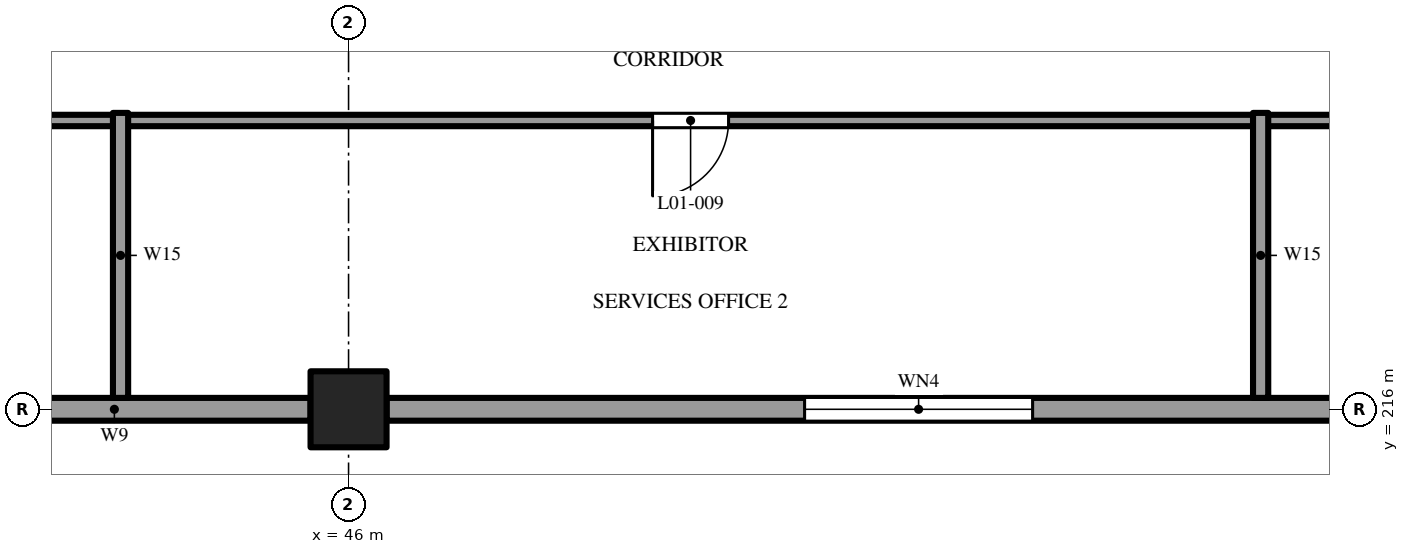
"""IFC4 building model, lengths in metres.
Left out: names, types, materials, properties, quantities, classifications, styles, units other than length and angle.
Written with IfcOpenShell. Run it as: python <this file> out.ifc"""

import sys

from ifc_helpers import new_model, si_unit, direction, frame, frame_2d, origin, origin_2d, place, context, subcontext, project, spatial, polyline, rectangle, outline, extrude, element, fill, save


model = new_model("IFC4")
c1 = context("Model", 3, precision=1e-05, world=origin(), true_north=direction((0.0, 1.0)))
c2 = subcontext(c1, "Body", "Model", "MODEL_VIEW")
j1 = project(units=[si_unit("LENGTHUNIT", "METRE"), si_unit("PLANEANGLEUNIT", "RADIAN")], contexts=[c1])
p1 = place(None, origin())
s1 = spatial("IfcSite", under=j1, at=p1, CompositionType="ELEMENT")
p2 = place(p1, origin())
s2 = spatial("IfcBuilding", under=s1, at=p2, CompositionType="ELEMENT")
p3 = place(p2, frame((0.0, 0.0, 7.2)))
s3 = spatial("IfcBuildingStorey", under=s2, at=p3, CompositionType="ELEMENT", Elevation=7.2)
p4 = place(p3, frame((46.0, 216.0, 0.0), z_axis=(0.0, 0.0, 1.0), x_axis=(1.0, 0.0, 0.0)))
e1 = element("IfcColumn", 1, at=p4, inside=s3, PredefinedType="COLUMN", context=c2, shape_type="SweptSolid", body=[
    extrude(rectangle(XDim=1.0, YDim=1.0, at=origin_2d()), origin(), (0.0, 0.0, 1.0), 4.8),
])
p5 = place(p3, frame((28.5, 216.0, 0.0), z_axis=(0.0, 0.0, 1.0), x_axis=(1.0, 0.0, 0.0)))
e2 = element("IfcWall", 2, at=p5, inside=s3, PredefinedType="SOLIDWALL", context=c2, shape_type="SweptSolid", body=[
    extrude(rectangle(XDim=17.0, YDim=0.3, at=frame_2d((8.5, 0.0))), origin(), (0.0, 0.0, 1.0), 4.8),
])
p6 = place(p5, frame((2.538, 0.0, 1.0)))
e3 = element("IfcOpeningElement", 3, at=p6, cuts=e2, PredefinedType="OPENING", context=c2, shape_type="SweptSolid", body=[
    extrude(rectangle(XDim=3.0, YDim=1.8, at=frame_2d((1.5, 0.9))), frame((0.0, 0.16, 0.0), z_axis=(0.0, -1.0, 0.0), x_axis=(1.0, 0.0, 0.0)), (0.0, 0.0, 1.0), 0.32),
])
p7 = place(p5, frame((8.538, 0.0, 1.0)))
e4 = element("IfcOpeningElement", 4, at=p7, cuts=e2, PredefinedType="OPENING", context=c2, shape_type="SweptSolid", body=[
    extrude(rectangle(XDim=3.0, YDim=1.8, at=frame_2d((1.5, 0.9))), frame((0.0, 0.16, 0.0), z_axis=(0.0, -1.0, 0.0), x_axis=(1.0, 0.0, 0.0)), (0.0, 0.0, 1.0), 0.32),
])
p8 = place(p3, frame((46.5, 216.0, 0.0), z_axis=(0.0, 0.0, 1.0), x_axis=(1.0, 0.0, 0.0)))
e5 = element("IfcWall", 5, at=p8, inside=s3, PredefinedType="SOLIDWALL", context=c2, shape_type="SweptSolid", body=[
    extrude(rectangle(XDim=17.0, YDim=0.3, at=frame_2d((8.5, 0.0))), origin(), (0.0, 0.0, 1.0), 4.8),
])
p9 = place(p8, frame((5.5, 0.0, 1.0)))
e6 = element("IfcOpeningElement", 6, at=p9, cuts=e5, PredefinedType="OPENING", context=c2, shape_type="SweptSolid", body=[
    extrude(rectangle(XDim=3.0, YDim=1.8, at=frame_2d((1.5, 0.9))), frame((0.0, 0.16, 0.0), z_axis=(0.0, -1.0, 0.0), x_axis=(1.0, 0.0, 0.0)), (0.0, 0.0, 1.0), 0.32),
])
p10 = place(p3, frame((28.175, 219.8, 0.0), z_axis=(0.0, 0.0, 1.0), x_axis=(1.0, 0.0, 0.0)))
e7 = element("IfcWall", 7, at=p10, inside=s3, PredefinedType="PARTITIONING", context=c2, shape_type="SweptSolid", body=[
    extrude(rectangle(XDim=123.0, YDim=0.15, at=frame_2d((61.5, 0.0))), origin(), (0.0, 0.0, 1.0), 4.547),
])
p11 = place(p10, frame((6.863, 0.0, 0.0)))
e8 = element("IfcOpeningElement", 8, at=p11, cuts=e7, PredefinedType="OPENING", context=c2, shape_type="SweptSolid", body=[
    extrude(rectangle(XDim=1.0, YDim=2.1, at=frame_2d((0.5, 1.05))), frame((0.0, 0.085, 0.0), z_axis=(0.0, -1.0, 0.0), x_axis=(1.0, 0.0, 0.0)), (0.0, 0.0, 1.0), 0.17),
])
p12 = place(p10, frame((21.825, 0.0, 0.0)))
e9 = element("IfcOpeningElement", 9, at=p12, cuts=e7, PredefinedType="OPENING", context=c2, shape_type="SweptSolid", body=[
    extrude(rectangle(XDim=1.0, YDim=2.1, at=frame_2d((0.5, 1.05))), frame((0.0, 0.085, 0.0), z_axis=(0.0, -1.0, 0.0), x_axis=(1.0, 0.0, 0.0)), (0.0, 0.0, 1.0), 0.17),
])
p13 = place(p10, frame((36.825, 0.0, 0.0)))
e10 = element("IfcOpeningElement", 10, at=p13, cuts=e7, PredefinedType="OPENING", context=c2, shape_type="SweptSolid", body=[
    extrude(rectangle(XDim=1.0, YDim=2.1, at=frame_2d((0.5, 1.05))), frame((0.0, 0.085, 0.0), z_axis=(0.0, -1.0, 0.0), x_axis=(1.0, 0.0, 0.0)), (0.0, 0.0, 1.0), 0.17),
])
p14 = place(p10, frame((51.825, 0.0, 0.0)))
e11 = element("IfcOpeningElement", 11, at=p14, cuts=e7, PredefinedType="OPENING", context=c2, shape_type="SweptSolid", body=[
    extrude(rectangle(XDim=1.0, YDim=2.1, at=frame_2d((0.5, 1.05))), frame((0.0, 0.085, 0.0), z_axis=(0.0, -1.0, 0.0), x_axis=(1.0, 0.0, 0.0)), (0.0, 0.0, 1.0), 0.17),
])
p15 = place(p10, frame((62.725, 0.0, 0.0)))
e12 = element("IfcOpeningElement", 12, at=p15, cuts=e7, PredefinedType="OPENING", context=c2, shape_type="SweptSolid", body=[
    extrude(rectangle(XDim=1.2, YDim=2.1, at=frame_2d((0.6, 1.05))), frame((0.0, 0.085, 0.0), z_axis=(0.0, -1.0, 0.0), x_axis=(1.0, 0.0, 0.0)), (0.0, 0.0, 1.0), 0.17),
])
p16 = place(p10, frame((79.325, 0.0, 0.0)))
e13 = element("IfcOpeningElement", 13, at=p16, cuts=e7, PredefinedType="OPENING", context=c2, shape_type="SweptSolid", body=[
    extrude(rectangle(XDim=1.0, YDim=2.1, at=frame_2d((0.5, 1.05))), frame((0.0, 0.085, 0.0), z_axis=(0.0, -1.0, 0.0), x_axis=(1.0, 0.0, 0.0)), (0.0, 0.0, 1.0), 0.17),
])
p17 = place(p10, frame((96.825, 0.0, 0.0)))
e14 = element("IfcOpeningElement", 14, at=p17, cuts=e7, PredefinedType="OPENING", context=c2, shape_type="SweptSolid", body=[
    extrude(rectangle(XDim=1.0, YDim=2.1, at=frame_2d((0.5, 1.05))), frame((0.0, 0.085, 0.0), z_axis=(0.0, -1.0, 0.0), x_axis=(1.0, 0.0, 0.0)), (0.0, 0.0, 1.0), 0.17),
])
p18 = place(p10, frame((105.825, 0.0, 0.0)))
e15 = element("IfcOpeningElement", 15, at=p18, cuts=e7, PredefinedType="OPENING", context=c2, shape_type="SweptSolid", body=[
    extrude(rectangle(XDim=1.0, YDim=2.1, at=frame_2d((0.5, 1.05))), frame((0.0, 0.085, 0.0), z_axis=(0.0, -1.0, 0.0), x_axis=(1.0, 0.0, 0.0)), (0.0, 0.0, 1.0), 0.17),
])
p19 = place(p10, frame((112.575, 0.0, 0.0)))
e16 = element("IfcOpeningElement", 16, at=p19, cuts=e7, PredefinedType="OPENING", context=c2, shape_type="SweptSolid", body=[
    extrude(rectangle(XDim=1.0, YDim=2.1, at=frame_2d((0.5, 1.05))), frame((0.0, 0.085, 0.0), z_axis=(0.0, -1.0, 0.0), x_axis=(1.0, 0.0, 0.0)), (0.0, 0.0, 1.0), 0.17),
])
p20 = place(p10, frame((119.725, 0.0, 0.0)))
e17 = element("IfcOpeningElement", 17, at=p20, cuts=e7, PredefinedType="OPENING", context=c2, shape_type="SweptSolid", body=[
    extrude(rectangle(XDim=1.2, YDim=2.1, at=frame_2d((0.6, 1.05))), frame((0.0, 0.085, 0.0), z_axis=(0.0, -1.0, 0.0), x_axis=(1.0, 0.0, 0.0)), (0.0, 0.0, 1.0), 0.17),
])
for number, where, z_axis, x_axis in (
    (18, (43.0, 216.15, 0.0), (0.0, 0.0, 1.0), (0.0, 1.0, 0.0)),
    (19, (58.0, 216.15, 0.0), (0.0, 0.0, 1.0), (0.0, 1.0, 0.0)),
):
    element("IfcWall", number, at=place(p3, frame(where, z_axis=z_axis, x_axis=x_axis)), inside=s3, PredefinedType="PARTITIONING", context=c2, shape_type="SweptSolid", body=[
        extrude(outline(polyline([(0.0, 0.0), (3.75, 0.0), (3.75, 4.541), (0.0, 4.737), (0.0, 0.0)])), frame((0.0, 0.1, 0.0), z_axis=(0.0, -1.0, 0.0), x_axis=(1.0, 0.0, 0.0)), (0.0, 0.0, 1.0), 0.2),
    ])
p21 = place(p9, origin())
e20 = element("IfcWindow", 20, at=p21, inside=s3, PartitioningType="SINGLE_PANEL", PredefinedType="WINDOW", context=c2, shape_type="SweptSolid", body=[
    extrude(rectangle(XDim=3.0, YDim=1.8, at=frame_2d((1.5, 0.9))), frame((0.0, 0.03, 0.0), z_axis=(0.0, -1.0, 0.0), x_axis=(1.0, 0.0, 0.0)), (0.0, 0.0, 1.0), 0.06),
])
fill(e6, e20)
p22 = place(p12, frame((1.0, 0.0, 0.0), z_axis=(0.0, 0.0, 1.0), x_axis=(-1.0, 0.0, 0.0)))
e21 = element("IfcDoor", 21, at=p22, inside=s3, OperationType="SINGLE_SWING_RIGHT", PredefinedType="DOOR", context=c2, shape_type="SweptSolid", body=[
    extrude(rectangle(XDim=1.0, YDim=2.1, at=frame_2d((0.5, 1.05))), frame((0.0, 0.025, 0.0), z_axis=(0.0, -1.0, 0.0), x_axis=(1.0, 0.0, 0.0)), (0.0, 0.0, 1.0), 0.05),
])
fill(e9, e21)
save(model, sys.argv[1])
